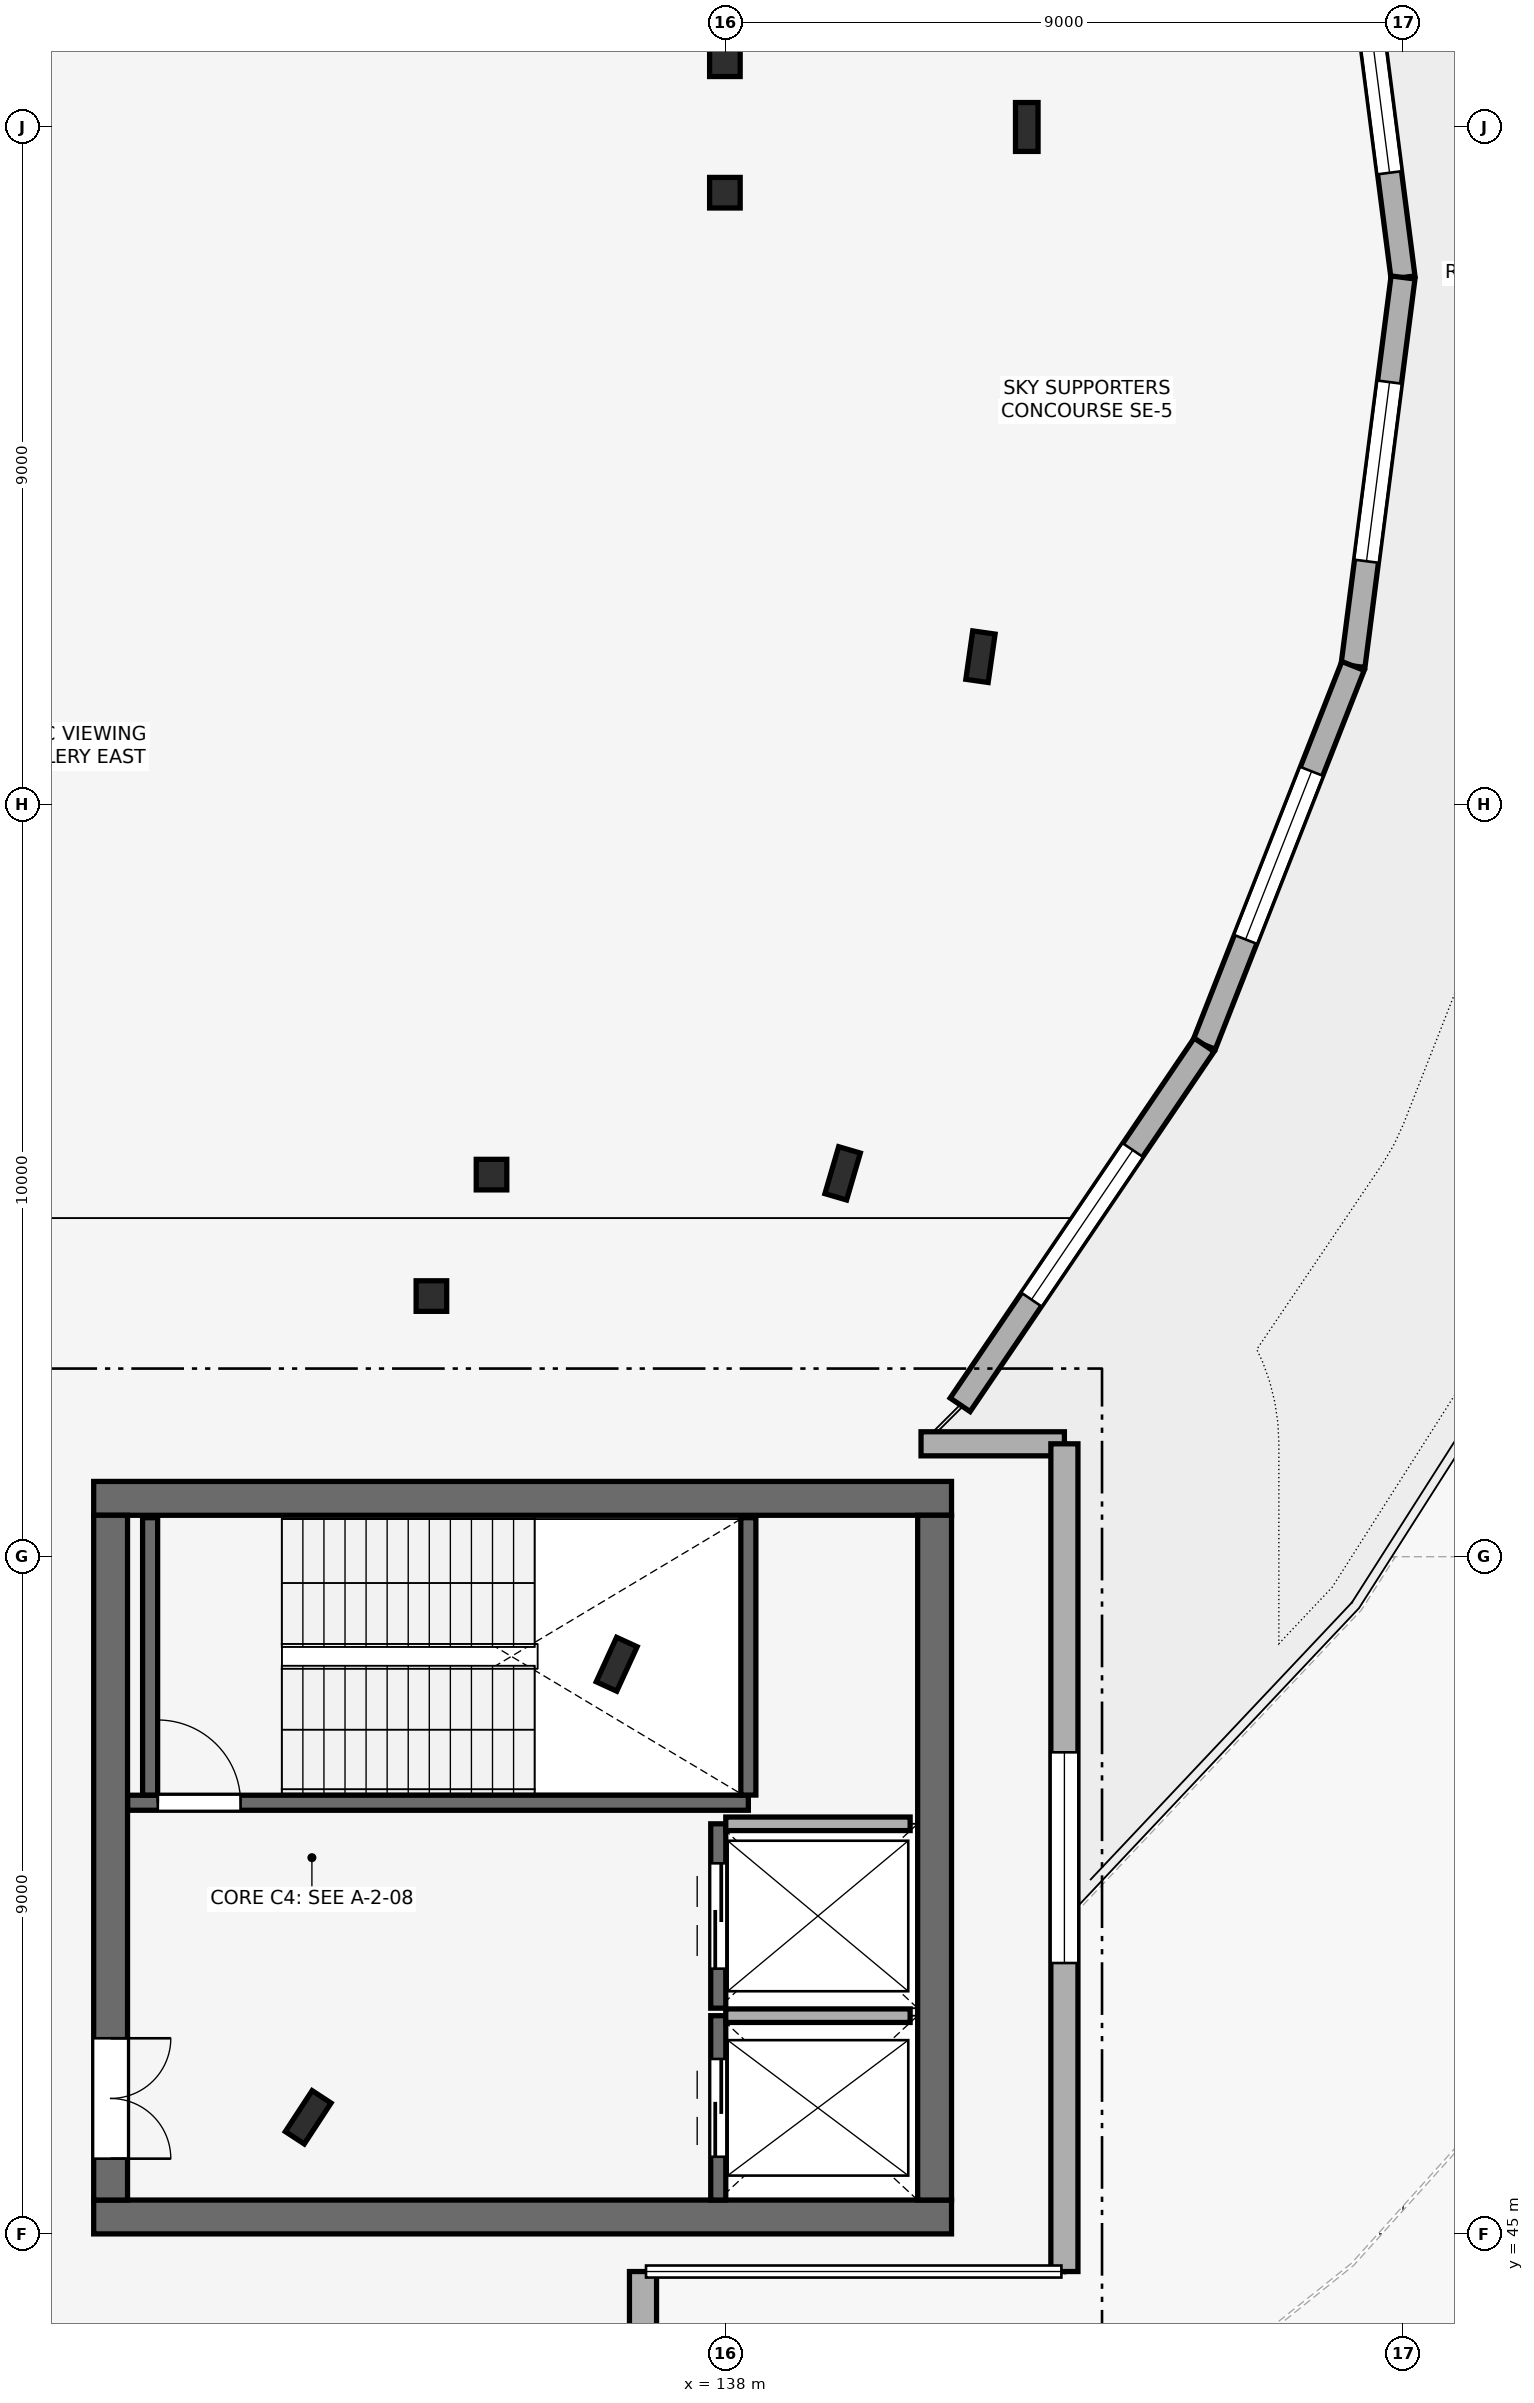
"""IFC4 building model, lengths in metres.
Left out: names, types, materials, properties, quantities, classifications, styles, units other than length and angle.
Written with IfcOpenShell. Run it as: python <this file> out.ifc"""

import sys

from ifc_helpers import new_model, si_unit, direction, frame, frame_2d, origin, origin_2d, place, context, subcontext, project, spatial, rectangle, hollow_circle, i_section, extrude, element, fill, save


model = new_model("IFC4")
c1 = context("Model", 3, precision=1e-05, world=origin(), true_north=direction((0.0, 1.0)))
c2 = subcontext(c1, "Body", "Model", "MODEL_VIEW")
j1 = project(units=[si_unit("LENGTHUNIT", "METRE"), si_unit("PLANEANGLEUNIT", "RADIAN")], contexts=[c1])
p1 = place(None, origin())
s1 = spatial("IfcSite", under=j1, at=p1, CompositionType="ELEMENT")
p2 = place(p1, origin())
s2 = spatial("IfcBuilding", under=s1, at=p2, CompositionType="ELEMENT")
p3 = place(p2, frame((0.0, 0.0, 19.5)))
s3 = spatial("IfcBuildingStorey", under=s2, at=p3, CompositionType="ELEMENT", Elevation=19.5)
for number, where, z_axis, x_axis in (
    (1, (142.0, 73.0, 0.0), (0.0, 0.0, 1.0), (1.0, 0.0, 0.0)),
    (2, (132.451, 46.55, 0.0), (0.0, 0.0, 1.0), (0.837, -0.547, 0.0)),
    (3, (136.55, 52.57, 0.0), (0.0, 0.0, 1.0), (0.909, -0.417, 0.0)),
    (4, (139.553, 59.094, 0.0), (0.0, 0.0, 1.0), (0.96, -0.281, 0.0)),
    (5, (141.385, 65.96, 0.0), (0.0, 0.0, 1.0), (0.99, -0.141, 0.0)),
):
    element("IfcColumn", number, at=place(p3, frame(where, z_axis=z_axis, x_axis=x_axis)), inside=s3, PredefinedType="COLUMN", context=c2, shape_type="SweptSolid", body=[
        extrude(i_section(OverallWidth=0.3, OverallDepth=0.65, WebThickness=0.016, FlangeThickness=0.031, FilletRadius=0.027, at=origin_2d()), origin(), (0.0, 0.0, 1.0), 4.5),
    ])
for number, where, z_axis, x_axis in (
    (6, (129.6, 45.225, 0.0), (0.0, 0.0, 1.0), (1.0, 0.0, 0.0)),
    (7, (129.6, 54.775, 0.0), (0.0, 0.0, 1.0), (1.0, 0.0, 0.0)),
):
    element("IfcWall", number, at=place(p3, frame(where, z_axis=z_axis, x_axis=x_axis)), inside=s3, PredefinedType="SHEAR", context=c2, shape_type="SweptSolid", body=[
        extrude(rectangle(XDim=11.4, YDim=0.45, at=frame_2d((5.7, 0.0))), origin(), (0.0, 0.0, 1.0), 4.5),
    ])
p4 = place(p3, frame((129.825, 45.45, 0.0), z_axis=(0.0, 0.0, 1.0), x_axis=(0.0, 1.0, 0.0)))
e8 = element("IfcWall", 8, at=p4, inside=s3, PredefinedType="SHEAR", context=c2, shape_type="SweptSolid", body=[
    extrude(rectangle(XDim=9.1, YDim=0.45, at=frame_2d((4.55, 0.0))), origin(), (0.0, 0.0, 1.0), 4.5),
])
p5 = place(p4, frame((0.55, 0.0, 0.0)))
e9 = element("IfcOpeningElement", 9, at=p5, cuts=e8, PredefinedType="OPENING", context=c2, shape_type="SweptSolid", body=[
    extrude(rectangle(XDim=1.6, YDim=2.2, at=frame_2d((0.8, 1.1))), frame((0.0, 0.235, 0.0), z_axis=(0.0, -1.0, 0.0), x_axis=(1.0, 0.0, 0.0)), (0.0, 0.0, 1.0), 0.47),
])
p6 = place(p3, frame((140.775, 45.45, 0.0), z_axis=(0.0, 0.0, 1.0), x_axis=(0.0, 1.0, 0.0)))
e10 = element("IfcWall", 10, at=p6, inside=s3, PredefinedType="SHEAR", context=c2, shape_type="SweptSolid", body=[
    extrude(rectangle(XDim=9.1, YDim=0.45, at=frame_2d((4.55, 0.0))), origin(), (0.0, 0.0, 1.0), 4.5),
])
for number, where, z_axis, x_axis in (
    (11, (137.988, 73.874, 0.0), (0.0, 0.0, 1.0), (1.0, 0.0, 0.0)),
    (12, (134.088, 57.463, 0.0), (0.0, 0.0, 1.0), (1.0, 0.0, 0.0)),
    (13, (134.887, 59.077, 0.0), (0.0, 0.0, 1.0), (1.0, 0.0, 0.0)),
    (14, (137.988, 72.126, 0.0), (0.0, 0.0, 1.0), (1.0, 0.0, 0.0)),
):
    element("IfcColumn", number, at=place(p3, frame(where, z_axis=z_axis, x_axis=x_axis)), inside=s3, PredefinedType="COLUMN", context=c2, shape_type="SweptSolid", body=[
        extrude(hollow_circle(Radius=0.203, WallThickness=0.016, at=origin_2d()), origin(), (0.0, 0.0, 1.0), 4.5),
    ])
p7 = place(p3, frame((146.335, 76.162, 0.0), z_axis=(0.0, 0.0, 1.0), x_axis=(0.127722788999, -0.991809905763, 0.0)))
e15 = element("IfcWall", 15, at=p7, inside=s3, PredefinedType="STANDARD", context=c2, shape_type="SweptSolid", body=[
    extrude(rectangle(XDim=5.205, YDim=0.32, at=frame_2d((2.603, 0.0))), origin(), (0.0, 0.0, 1.0), 4.25),
])
p8 = place(p7, frame((1.402, 0.0, 1.15)))
e16 = element("IfcOpeningElement", 16, at=p8, cuts=e15, PredefinedType="OPENING", context=c2, shape_type="SweptSolid", body=[
    extrude(rectangle(XDim=2.4, YDim=1.4, at=frame_2d((1.2, 0.7))), frame((0.0, 0.17, 0.0), z_axis=(0.0, -1.0, 0.0), x_axis=(1.0, 0.0, 0.0)), (0.0, 0.0, 1.0), 0.34),
])
p9 = place(p3, frame((147.0, 71.0, 0.0), z_axis=(0.0, 0.0, 1.0), x_axis=(-0.127722788999, -0.991809905763, 0.0)))
e17 = element("IfcWall", 17, at=p9, inside=s3, PredefinedType="STANDARD", context=c2, shape_type="SweptSolid", body=[
    extrude(rectangle(XDim=5.205, YDim=0.32, at=frame_2d((2.603, 0.0))), origin(), (0.0, 0.0, 1.0), 4.25),
])
p10 = place(p9, frame((1.402, 0.0, 1.15)))
e18 = element("IfcOpeningElement", 18, at=p10, cuts=e17, PredefinedType="OPENING", context=c2, shape_type="SweptSolid", body=[
    extrude(rectangle(XDim=2.4, YDim=1.4, at=frame_2d((1.2, 0.7))), frame((0.0, 0.17, 0.0), z_axis=(0.0, -1.0, 0.0), x_axis=(1.0, 0.0, 0.0)), (0.0, 0.0, 1.0), 0.34),
])
p11 = place(p3, frame((146.335, 65.838, 0.0), z_axis=(0.0, 0.0, 1.0), x_axis=(-0.365641202161, -0.93075588168, 0.0)))
e19 = element("IfcWall", 19, at=p11, inside=s3, PredefinedType="STANDARD", context=c2, shape_type="SweptSolid", body=[
    extrude(rectangle(XDim=5.41, YDim=0.32, at=frame_2d((2.705, 0.0))), origin(), (0.0, 0.0, 1.0), 4.25),
])
p12 = place(p11, frame((1.505, 0.0, 1.15)))
e20 = element("IfcOpeningElement", 20, at=p12, cuts=e19, PredefinedType="OPENING", context=c2, shape_type="SweptSolid", body=[
    extrude(rectangle(XDim=2.4, YDim=1.4, at=frame_2d((1.2, 0.7))), frame((0.0, 0.17, 0.0), z_axis=(0.0, -1.0, 0.0), x_axis=(1.0, 0.0, 0.0)), (0.0, 0.0, 1.0), 0.34),
])
p13 = place(p3, frame((144.357, 60.802, 0.0), z_axis=(0.0, 0.0, 1.0), x_axis=(-0.561059216787, -0.82777566723, 0.0)))
e21 = element("IfcWall", 21, at=p13, inside=s3, PredefinedType="STANDARD", context=c2, shape_type="SweptSolid", body=[
    extrude(rectangle(XDim=5.78, YDim=0.32, at=frame_2d((2.89, 0.0))), origin(), (0.0, 0.0, 1.0), 4.25),
])
p14 = place(p13, frame((1.69, 0.0, 1.15)))
e22 = element("IfcOpeningElement", 22, at=p14, cuts=e21, PredefinedType="OPENING", context=c2, shape_type="SweptSolid", body=[
    extrude(rectangle(XDim=2.4, YDim=1.4, at=frame_2d((1.2, 0.7))), frame((0.0, 0.17, 0.0), z_axis=(0.0, -1.0, 0.0), x_axis=(1.0, 0.0, 0.0)), (0.0, 0.0, 1.0), 0.34),
])
p15 = place(p3, frame((140.595, 55.5, 0.0), z_axis=(0.0, 0.0, 1.0), x_axis=(1.0, 0.0, 0.0)))
e23 = element("IfcWall", 23, at=p15, inside=s3, PredefinedType="STANDARD", context=c2, shape_type="SweptSolid", body=[
    extrude(rectangle(XDim=1.905, YDim=0.32, at=frame_2d((0.953, 0.0))), origin(), (0.0, 0.0, 1.0), 4.25),
])
p16 = place(p3, frame((142.5, 55.5, 0.0), z_axis=(0.0, 0.0, 1.0), x_axis=(0.0, -1.0, 0.0)))
e24 = element("IfcWall", 24, at=p16, inside=s3, PredefinedType="STANDARD", context=c2, shape_type="SweptSolid", body=[
    extrude(rectangle(XDim=11.0, YDim=0.36, at=frame_2d((5.5, 0.0))), origin(), (0.0, 0.0, 1.0), 4.25),
])
p17 = place(p16, frame((4.1, 0.0, 0.9)))
e25 = element("IfcOpeningElement", 25, at=p17, cuts=e24, PredefinedType="OPENING", context=c2, shape_type="SweptSolid", body=[
    extrude(rectangle(XDim=2.8, YDim=1.9, at=frame_2d((1.4, 0.95))), frame((0.0, 0.19, 0.0), z_axis=(0.0, -1.0, 0.0), x_axis=(1.0, 0.0, 0.0)), (0.0, 0.0, 1.0), 0.38),
])
p18 = place(p3, frame((136.9, 44.5, 0.0), z_axis=(0.0, 0.0, 1.0), x_axis=(0.0, -1.0, 0.0)))
e26 = element("IfcWall", 26, at=p18, inside=s3, PredefinedType="STANDARD", context=c2, shape_type="SweptSolid", body=[
    extrude(rectangle(XDim=10.7, YDim=0.36, at=frame_2d((5.35, 0.0))), origin(), (0.0, 0.0, 1.0), 4.25),
])
p19 = place(p18, frame((3.95, 0.0, 0.9)))
e27 = element("IfcOpeningElement", 27, at=p19, cuts=e26, PredefinedType="OPENING", context=c2, shape_type="SweptSolid", body=[
    extrude(rectangle(XDim=2.8, YDim=1.9, at=frame_2d((1.4, 0.95))), frame((0.0, 0.19, 0.0), z_axis=(0.0, -1.0, 0.0), x_axis=(1.0, 0.0, 0.0)), (0.0, 0.0, 1.0), 0.38),
])
p20 = place(p3, frame((137.9, 45.45, 0.0), z_axis=(0.0, 0.0, 1.0), x_axis=(0.0, 1.0, 0.0)))
e28 = element("IfcWall", 28, at=p20, inside=s3, PredefinedType="SHEAR", context=c2, shape_type="SweptSolid", body=[
    extrude(rectangle(XDim=2.45, YDim=0.2, at=frame_2d((1.225, 0.0))), origin(), (0.0, 0.0, 1.0), 4.25),
])
p21 = place(p20, frame((0.575, 0.0, 0.0)))
e29 = element("IfcOpeningElement", 29, at=p21, cuts=e28, PredefinedType="OPENING", context=c2, shape_type="SweptSolid", body=[
    extrude(rectangle(XDim=1.3, YDim=2.2, at=frame_2d((0.65, 1.1))), frame((0.0, 0.11, 0.0), z_axis=(0.0, -1.0, 0.0), x_axis=(1.0, 0.0, 0.0)), (0.0, 0.0, 1.0), 0.22),
])
p22 = place(p3, frame((138.0, 47.9, 0.0), z_axis=(0.0, 0.0, 1.0), x_axis=(1.0, 0.0, 0.0)))
e30 = element("IfcWall", 30, at=p22, inside=s3, PredefinedType="PARTITIONING", context=c2, shape_type="SweptSolid", body=[
    extrude(rectangle(XDim=2.45, YDim=0.18, at=frame_2d((1.225, 0.0))), origin(), (0.0, 0.0, 1.0), 4.5),
])
p23 = place(p3, frame((137.9, 48.0, 0.0), z_axis=(0.0, 0.0, 1.0), x_axis=(0.0, 1.0, 0.0)))
e31 = element("IfcWall", 31, at=p23, inside=s3, PredefinedType="SHEAR", context=c2, shape_type="SweptSolid", body=[
    extrude(rectangle(XDim=2.45, YDim=0.2, at=frame_2d((1.225, 0.0))), origin(), (0.0, 0.0, 1.0), 4.25),
])
p24 = place(p23, frame((0.525, 0.0, 0.0)))
e32 = element("IfcOpeningElement", 32, at=p24, cuts=e31, PredefinedType="OPENING", context=c2, shape_type="SweptSolid", body=[
    extrude(rectangle(XDim=1.4, YDim=2.2, at=frame_2d((0.7, 1.1))), frame((0.0, 0.11, 0.0), z_axis=(0.0, -1.0, 0.0), x_axis=(1.0, 0.0, 0.0)), (0.0, 0.0, 1.0), 0.22),
])
p25 = place(p3, frame((138.0, 50.45, 0.0), z_axis=(0.0, 0.0, 1.0), x_axis=(1.0, 0.0, 0.0)))
e33 = element("IfcWall", 33, at=p25, inside=s3, PredefinedType="PARTITIONING", context=c2, shape_type="SweptSolid", body=[
    extrude(rectangle(XDim=2.45, YDim=0.18, at=frame_2d((1.225, 0.0))), origin(), (0.0, 0.0, 1.0), 4.5),
])
p26 = place(p3, frame((130.052, 50.73, 0.0), z_axis=(0.0, 0.0, 1.0), x_axis=(1.0, 0.0, 0.0)))
e34 = element("IfcWall", 34, at=p26, inside=s3, PredefinedType="SHEAR", context=c2, shape_type="SweptSolid", body=[
    extrude(rectangle(XDim=8.248, YDim=0.2, at=frame_2d((4.124, 0.0))), origin(), (0.0, 0.0, 1.0), 4.5),
])
p27 = place(p26, frame((0.4, 0.0, 0.0)))
e35 = element("IfcOpeningElement", 35, at=p27, cuts=e34, PredefinedType="OPENING", context=c2, shape_type="SweptSolid", body=[
    extrude(rectangle(XDim=1.1, YDim=2.15, at=frame_2d((0.55, 1.075))), frame((0.0, 0.11, 0.0), z_axis=(0.0, -1.0, 0.0), x_axis=(1.0, 0.0, 0.0)), (0.0, 0.0, 1.0), 0.22),
])
for number, where, z_axis, x_axis in (
    (36, (130.35, 50.832, 0.0), (0.0, 0.0, 1.0), (0.0, 1.0, 0.0)),
    (37, (138.3, 50.832, 0.0), (0.0, 0.0, 1.0), (0.0, 1.0, 0.0)),
):
    element("IfcWall", number, at=place(p3, frame(where, z_axis=z_axis, x_axis=x_axis)), inside=s3, PredefinedType="SHEAR", context=c2, shape_type="SweptSolid", body=[
        extrude(rectangle(XDim=3.686, YDim=0.2, at=frame_2d((1.843, 0.0))), origin(), (0.0, 0.0, 1.0), 4.5),
    ])
p28 = place(p8, origin())
e38 = element("IfcWindow", 38, at=p28, inside=s3, PartitioningType="SINGLE_PANEL", PredefinedType="WINDOW", context=c2, shape_type="SweptSolid", body=[
    extrude(rectangle(XDim=2.4, YDim=1.4, at=frame_2d((1.2, 0.7))), frame((0.0, 0.03, 0.0), z_axis=(0.0, -1.0, 0.0), x_axis=(1.0, 0.0, 0.0)), (0.0, 0.0, 1.0), 0.06),
])
fill(e16, e38)
p29 = place(p10, origin())
e39 = element("IfcWindow", 39, at=p29, inside=s3, PartitioningType="SINGLE_PANEL", PredefinedType="WINDOW", context=c2, shape_type="SweptSolid", body=[
    extrude(rectangle(XDim=2.4, YDim=1.4, at=frame_2d((1.2, 0.7))), frame((0.0, 0.03, 0.0), z_axis=(0.0, -1.0, 0.0), x_axis=(1.0, 0.0, 0.0)), (0.0, 0.0, 1.0), 0.06),
])
fill(e18, e39)
p30 = place(p12, origin())
e40 = element("IfcWindow", 40, at=p30, inside=s3, PartitioningType="SINGLE_PANEL", PredefinedType="WINDOW", context=c2, shape_type="SweptSolid", body=[
    extrude(rectangle(XDim=2.4, YDim=1.4, at=frame_2d((1.2, 0.7))), frame((0.0, 0.03, 0.0), z_axis=(0.0, -1.0, 0.0), x_axis=(1.0, 0.0, 0.0)), (0.0, 0.0, 1.0), 0.06),
])
fill(e20, e40)
p31 = place(p14, origin())
e41 = element("IfcWindow", 41, at=p31, inside=s3, PartitioningType="SINGLE_PANEL", PredefinedType="WINDOW", context=c2, shape_type="SweptSolid", body=[
    extrude(rectangle(XDim=2.4, YDim=1.4, at=frame_2d((1.2, 0.7))), frame((0.0, 0.03, 0.0), z_axis=(0.0, -1.0, 0.0), x_axis=(1.0, 0.0, 0.0)), (0.0, 0.0, 1.0), 0.06),
])
fill(e22, e41)
p32 = place(p17, origin())
e42 = element("IfcWindow", 42, at=p32, inside=s3, PartitioningType="SINGLE_PANEL", PredefinedType="WINDOW", context=c2, shape_type="SweptSolid", body=[
    extrude(rectangle(XDim=2.8, YDim=1.9, at=frame_2d((1.4, 0.95))), frame((0.0, 0.03, 0.0), z_axis=(0.0, -1.0, 0.0), x_axis=(1.0, 0.0, 0.0)), (0.0, 0.0, 1.0), 0.06),
])
fill(e25, e42)
p33 = place(p21, origin())
e43 = element("IfcDoor", 43, at=p33, inside=s3, OperationType="DOUBLE_DOOR_SLIDING", PredefinedType="DOOR", context=c2, shape_type="SweptSolid", body=[
    extrude(rectangle(XDim=1.3, YDim=2.2, at=frame_2d((0.65, 1.1))), frame((0.0, 0.025, 0.0), z_axis=(0.0, -1.0, 0.0), x_axis=(1.0, 0.0, 0.0)), (0.0, 0.0, 1.0), 0.05),
])
fill(e29, e43)
p34 = place(p24, origin())
e44 = element("IfcDoor", 44, at=p34, inside=s3, OperationType="DOUBLE_DOOR_SLIDING", PredefinedType="DOOR", context=c2, shape_type="SweptSolid", body=[
    extrude(rectangle(XDim=1.4, YDim=2.2, at=frame_2d((0.7, 1.1))), frame((0.0, 0.025, 0.0), z_axis=(0.0, -1.0, 0.0), x_axis=(1.0, 0.0, 0.0)), (0.0, 0.0, 1.0), 0.05),
])
fill(e32, e44)
p35 = place(p27, frame((1.1, 0.0, 0.0), z_axis=(0.0, 0.0, 1.0), x_axis=(-1.0, 0.0, 0.0)))
e45 = element("IfcDoor", 45, at=p35, inside=s3, OperationType="SINGLE_SWING_RIGHT", PredefinedType="DOOR", context=c2, shape_type="SweptSolid", body=[
    extrude(rectangle(XDim=1.1, YDim=2.15, at=frame_2d((0.55, 1.075))), frame((0.0, 0.025, 0.0), z_axis=(0.0, -1.0, 0.0), x_axis=(1.0, 0.0, 0.0)), (0.0, 0.0, 1.0), 0.05),
])
fill(e35, e45)
p36 = place(p5, frame((1.6, 0.0, 0.0), z_axis=(0.0, 0.0, 1.0), x_axis=(-1.0, 0.0, 0.0)))
e46 = element("IfcDoor", 46, at=p36, inside=s3, OperationType="DOUBLE_DOOR_SINGLE_SWING", PredefinedType="DOOR", context=c2, shape_type="SweptSolid", body=[
    extrude(rectangle(XDim=1.6, YDim=2.2, at=frame_2d((0.8, 1.1))), frame((0.0, 0.025, 0.0), z_axis=(0.0, -1.0, 0.0), x_axis=(1.0, 0.0, 0.0)), (0.0, 0.0, 1.0), 0.05),
])
fill(e9, e46)
save(model, sys.argv[1])
